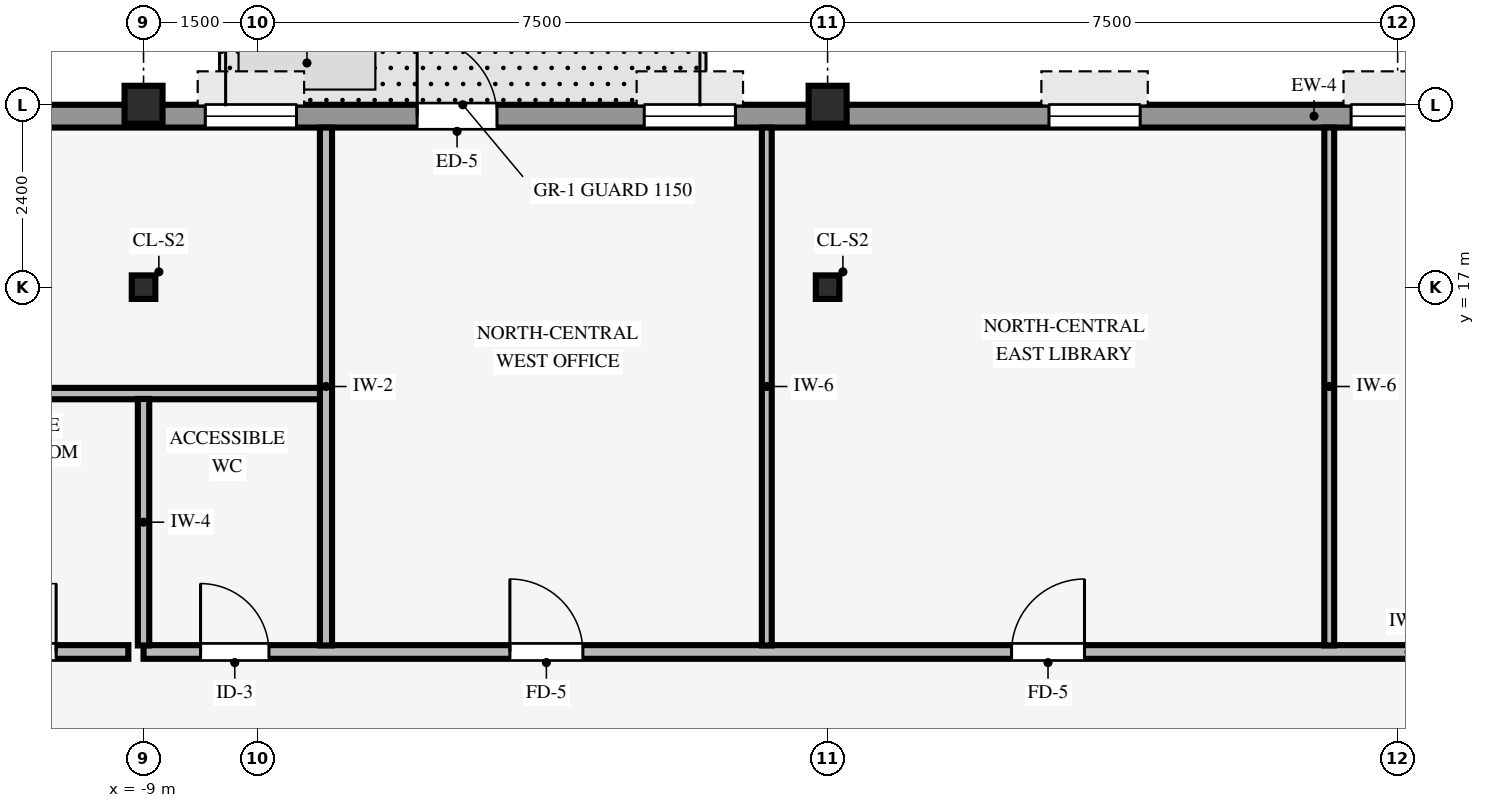
"""IFC4 building model, lengths in metres.
Left out: names, types, materials, properties, quantities, classifications, styles, units other than length and angle.
Written with IfcOpenShell. Run it as: python <this file> out.ifc"""

import sys

from ifc_helpers import new_model, si_unit, direction, frame, frame_2d, origin, origin_2d, place, context, subcontext, project, spatial, rectangle, hollow_rectangle, i_section, extrude, source, transform, mapped, element, fill, save


model = new_model("IFC4")
c1 = context("Model", 3, precision=1e-05, world=origin(), true_north=direction((0.0, 1.0)))
c2 = subcontext(c1, "Body", "Model", "MODEL_VIEW")
j1 = project(units=[si_unit("LENGTHUNIT", "METRE"), si_unit("PLANEANGLEUNIT", "RADIAN")], contexts=[c1])
p1 = place(None, origin())
s1 = spatial("IfcSite", under=j1, at=p1, CompositionType="ELEMENT")
p2 = place(p1, origin())
s2 = spatial("IfcBuilding", under=s1, at=p2, CompositionType="ELEMENT")
p3 = place(p2, frame((0.0, 0.0, 242.0)))
s3 = spatial("IfcBuildingStorey", under=s2, at=p3, CompositionType="ELEMENT", Elevation=242.0)
for number, where, z_axis, x_axis in (
    (1, (-9.0, 19.4, 0.0), (0.0, 0.0, 1.0), (1.0, 0.0, 0.0)),
    (2, (0.0, 19.4, 0.0), (0.0, 0.0, 1.0), (1.0, 0.0, 0.0)),
):
    element("IfcColumn", number, at=place(p3, frame(where, z_axis=z_axis, x_axis=x_axis)), inside=s3, PredefinedType="COLUMN", context=c2, shape_type="SweptSolid", body=[
        extrude(hollow_rectangle(XDim=0.5, YDim=0.5, WallThickness=0.032, InnerFilletRadius=0.032, OuterFilletRadius=0.064, at=origin_2d()), origin(), (0.0, 0.0, 1.0), 3.25),
    ])
for number, where, z_axis, x_axis in (
    (3, (0.0, 17.0, 0.0), (0.0, 0.0, 1.0), (1.0, 0.0, 0.0)),
    (4, (-9.0, 17.0, 0.0), (0.0, 0.0, 1.0), (1.0, 0.0, 0.0)),
):
    element("IfcColumn", number, at=place(p3, frame(where, z_axis=z_axis, x_axis=x_axis)), inside=s3, PredefinedType="COLUMN", context=c2, shape_type="SweptSolid", body=[
        extrude(i_section(OverallWidth=0.31, OverallDepth=0.31, WebThickness=0.015, FlangeThickness=0.015, FilletRadius=0.015, at=origin_2d()), origin(), (0.0, 0.0, 1.0), 3.25),
    ])
p4 = place(p3, frame((-24.3, 19.25, 0.0), z_axis=(0.0, 0.0, 1.0), x_axis=(1.0, 0.0, 0.0)))
e5 = element("IfcWall", 5, at=p4, inside=s3, PredefinedType="STANDARD", context=c2, shape_type="SweptSolid", body=[
    extrude(rectangle(XDim=41.0, YDim=0.3, at=frame_2d((20.5, 0.0))), origin(), (0.0, 0.0, 1.0), 2.585),
])
p5 = place(p4, frame((18.9, 0.0, 0.0)))
e6 = element("IfcOpeningElement", 6, at=p5, cuts=e5, PredefinedType="OPENING", context=c2, shape_type="SweptSolid", body=[
    extrude(rectangle(XDim=1.05, YDim=2.1, at=frame_2d((0.525, 1.05))), frame((0.0, 0.16, 0.0), z_axis=(0.0, -1.0, 0.0), x_axis=(1.0, 0.0, 0.0)), (0.0, 0.0, 1.0), 0.32),
])
p6 = place(p4, frame((2.837, 0.0, 0.8)))
e7 = element("IfcOpeningElement", 7, at=p6, cuts=e5, PredefinedType="OPENING", context=c2, shape_type="SweptSolid", body=[
    extrude(rectangle(XDim=1.2, YDim=1.48, at=frame_2d((0.6, 0.74))), frame((0.0, 0.16, 0.0), z_axis=(0.0, -1.0, 0.0), x_axis=(1.0, 0.0, 0.0)), (0.0, 0.0, 1.0), 0.32),
])
p7 = place(p4, frame((7.712, 0.0, 0.8)))
e8 = element("IfcOpeningElement", 8, at=p7, cuts=e5, PredefinedType="OPENING", context=c2, shape_type="SweptSolid", body=[
    extrude(rectangle(XDim=1.2, YDim=1.48, at=frame_2d((0.6, 0.74))), frame((0.0, 0.16, 0.0), z_axis=(0.0, -1.0, 0.0), x_axis=(1.0, 0.0, 0.0)), (0.0, 0.0, 1.0), 0.32),
])
p8 = place(p4, frame((12.587, 0.0, 0.8)))
e9 = element("IfcOpeningElement", 9, at=p8, cuts=e5, PredefinedType="OPENING", context=c2, shape_type="SweptSolid", body=[
    extrude(rectangle(XDim=1.2, YDim=1.48, at=frame_2d((0.6, 0.74))), frame((0.0, 0.16, 0.0), z_axis=(0.0, -1.0, 0.0), x_axis=(1.0, 0.0, 0.0)), (0.0, 0.0, 1.0), 0.32),
])
p9 = place(p4, frame((16.113, 0.0, 0.8)))
e10 = element("IfcOpeningElement", 10, at=p9, cuts=e5, PredefinedType="OPENING", context=c2, shape_type="SweptSolid", body=[
    extrude(rectangle(XDim=1.2, YDim=1.48, at=frame_2d((0.6, 0.74))), frame((0.0, 0.16, 0.0), z_axis=(0.0, -1.0, 0.0), x_axis=(1.0, 0.0, 0.0)), (0.0, 0.0, 1.0), 0.32),
])
p10 = place(p4, frame((21.887, 0.0, 0.8)))
e11 = element("IfcOpeningElement", 11, at=p10, cuts=e5, PredefinedType="OPENING", context=c2, shape_type="SweptSolid", body=[
    extrude(rectangle(XDim=1.2, YDim=1.48, at=frame_2d((0.6, 0.74))), frame((0.0, 0.16, 0.0), z_axis=(0.0, -1.0, 0.0), x_axis=(1.0, 0.0, 0.0)), (0.0, 0.0, 1.0), 0.32),
])
p11 = place(p4, frame((27.212, 0.0, 0.8)))
e12 = element("IfcOpeningElement", 12, at=p11, cuts=e5, PredefinedType="OPENING", context=c2, shape_type="SweptSolid", body=[
    extrude(rectangle(XDim=1.2, YDim=1.48, at=frame_2d((0.6, 0.74))), frame((0.0, 0.16, 0.0), z_axis=(0.0, -1.0, 0.0), x_axis=(1.0, 0.0, 0.0)), (0.0, 0.0, 1.0), 0.32),
])
p12 = place(p4, frame((31.188, 0.0, 0.8)))
e13 = element("IfcOpeningElement", 13, at=p12, cuts=e5, PredefinedType="OPENING", context=c2, shape_type="SweptSolid", body=[
    extrude(rectangle(XDim=1.2, YDim=1.48, at=frame_2d((0.6, 0.74))), frame((0.0, 0.16, 0.0), z_axis=(0.0, -1.0, 0.0), x_axis=(1.0, 0.0, 0.0)), (0.0, 0.0, 1.0), 0.32),
])
p13 = place(p4, frame((36.962, 0.0, 0.8)))
e14 = element("IfcOpeningElement", 14, at=p13, cuts=e5, PredefinedType="OPENING", context=c2, shape_type="SweptSolid", body=[
    extrude(rectangle(XDim=1.2, YDim=1.48, at=frame_2d((0.6, 0.74))), frame((0.0, 0.16, 0.0), z_axis=(0.0, -1.0, 0.0), x_axis=(1.0, 0.0, 0.0)), (0.0, 0.0, 1.0), 0.32),
])
p14 = place(p3, frame((-14.8, 12.2, 0.0), z_axis=(0.0, 0.0, 1.0), x_axis=(1.0, 0.0, 0.0)))
e15 = element("IfcWall", 15, at=p14, inside=s3, PredefinedType="PARTITIONING", context=c2, shape_type="SweptSolid", body=[
    extrude(rectangle(XDim=5.6, YDim=0.18, at=frame_2d((2.8, 0.0))), origin(), (0.0, 0.0, 1.0), 3.24),
])
p15 = place(p14, frame((0.95, 0.0, 0.0)))
e16 = element("IfcOpeningElement", 16, at=p15, cuts=e15, PredefinedType="OPENING", context=c2, shape_type="SweptSolid", body=[
    extrude(rectangle(XDim=0.9, YDim=2.1, at=frame_2d((0.45, 1.05))), frame((0.0, 0.1, 0.0), z_axis=(0.0, -1.0, 0.0), x_axis=(1.0, 0.0, 0.0)), (0.0, 0.0, 1.0), 0.2),
])
p16 = place(p14, frame((3.75, 0.0, 0.0)))
e17 = element("IfcOpeningElement", 17, at=p16, cuts=e15, PredefinedType="OPENING", context=c2, shape_type="SweptSolid", body=[
    extrude(rectangle(XDim=0.9, YDim=2.1, at=frame_2d((0.45, 1.05))), frame((0.0, 0.1, 0.0), z_axis=(0.0, -1.0, 0.0), x_axis=(1.0, 0.0, 0.0)), (0.0, 0.0, 1.0), 0.2),
])
p17 = place(p3, frame((-9.0, 12.2, 0.0), z_axis=(0.0, 0.0, 1.0), x_axis=(1.0, 0.0, 0.0)))
e18 = element("IfcWall", 18, at=p17, inside=s3, PredefinedType="PARTITIONING", context=c2, shape_type="SweptSolid", body=[
    extrude(rectangle(XDim=24.8, YDim=0.18, at=frame_2d((12.4, 0.0))), origin(), (0.0, 0.0, 1.0), 3.24),
])
p18 = place(p17, frame((11.42, 0.0, 0.0)))
e19 = element("IfcOpeningElement", 19, at=p18, cuts=e18, PredefinedType="OPENING", context=c2, shape_type="SweptSolid", body=[
    extrude(rectangle(XDim=0.96, YDim=2.1, at=frame_2d((0.48, 1.05))), frame((0.0, 0.1, 0.0), z_axis=(0.0, -1.0, 0.0), x_axis=(1.0, 0.0, 0.0)), (0.0, 0.0, 1.0), 0.2),
])
p19 = place(p17, frame((20.92, 0.0, 0.0)))
e20 = element("IfcOpeningElement", 20, at=p19, cuts=e18, PredefinedType="OPENING", context=c2, shape_type="SweptSolid", body=[
    extrude(rectangle(XDim=0.96, YDim=2.1, at=frame_2d((0.48, 1.05))), frame((0.0, 0.1, 0.0), z_axis=(0.0, -1.0, 0.0), x_axis=(1.0, 0.0, 0.0)), (0.0, 0.0, 1.0), 0.2),
])
p20 = place(p17, frame((4.82, 0.0, 0.0)))
e21 = element("IfcOpeningElement", 21, at=p20, cuts=e18, PredefinedType="OPENING", context=c2, shape_type="SweptSolid", body=[
    extrude(rectangle(XDim=0.96, YDim=2.1, at=frame_2d((0.48, 1.05))), frame((0.0, 0.1, 0.0), z_axis=(0.0, -1.0, 0.0), x_axis=(1.0, 0.0, 0.0)), (0.0, 0.0, 1.0), 0.2),
])
p21 = place(p17, frame((0.75, 0.0, 0.0)))
e22 = element("IfcOpeningElement", 22, at=p21, cuts=e18, PredefinedType="OPENING", context=c2, shape_type="SweptSolid", body=[
    extrude(rectangle(XDim=0.9, YDim=2.1, at=frame_2d((0.45, 1.05))), frame((0.0, 0.1, 0.0), z_axis=(0.0, -1.0, 0.0), x_axis=(1.0, 0.0, 0.0)), (0.0, 0.0, 1.0), 0.2),
])
p22 = place(p3, frame((-14.8, 15.6, 0.0), z_axis=(0.0, 0.0, 1.0), x_axis=(1.0, 0.0, 0.0)))
e23 = element("IfcWall", 23, at=p22, inside=s3, PredefinedType="PARTITIONING", context=c2, shape_type="SweptSolid", body=[
    extrude(rectangle(XDim=8.129, YDim=0.15, at=frame_2d((4.064, 0.0))), origin(), (0.0, 0.0, 1.0), 3.24),
])
p23 = place(p3, frame((-9.0, 12.286, 0.0), z_axis=(0.0, 0.0, 1.0), x_axis=(0.0, 1.0, 0.0)))
e24 = element("IfcWall", 24, at=p23, inside=s3, PredefinedType="PARTITIONING", context=c2, shape_type="SweptSolid", body=[
    extrude(rectangle(XDim=3.243, YDim=0.15, at=frame_2d((1.622, 0.0))), origin(), (0.0, 0.0, 1.0), 2.772),
])
p24 = place(p3, frame((-6.6, 12.286, 0.0), z_axis=(0.0, 0.0, 1.0), x_axis=(0.0, 1.0, 0.0)))
e25 = element("IfcWall", 25, at=p24, inside=s3, PredefinedType="PARTITIONING", context=c2, shape_type="SweptSolid", body=[
    extrude(rectangle(XDim=6.814, YDim=0.16, at=frame_2d((3.407, 0.0))), origin(), (0.0, 0.0, 1.0), 3.24),
])
for number, where, z_axis, x_axis in (
    (26, (-0.8, 12.286, 0.0), (0.0, 0.0, 1.0), (0.0, 1.0, 0.0)),
    (27, (6.6, 12.286, 0.0), (0.0, 0.0, 1.0), (0.0, 1.0, 0.0)),
):
    element("IfcWall", number, at=place(p3, frame(where, z_axis=z_axis, x_axis=x_axis)), inside=s3, PredefinedType="PARTITIONING", context=c2, shape_type="SweptSolid", body=[
        extrude(rectangle(XDim=6.814, YDim=0.13, at=frame_2d((3.407, 0.0))), origin(), (0.0, 0.0, 1.0), 3.24),
    ])
m1 = source(origin(), c2, "Body", "SweptSolid", [
    extrude(rectangle(XDim=1.05, YDim=2.1, at=frame_2d((0.525, 1.05))), frame((0.0, 0.025, 0.0), z_axis=(0.0, -1.0, 0.0), x_axis=(1.0, 0.0, 0.0)), (0.0, 0.0, 1.0), 0.05),
])
p25 = place(p5, origin())
e28 = element("IfcDoor", 28, at=p25, inside=s3, OperationType="SINGLE_SWING_LEFT", PredefinedType="DOOR", context=c2, shape_type="MappedRepresentation", body=[
    mapped(m1, transform((0.0, 0.0, 0.0), scale=1.0)),
])
fill(e6, e28)
m2 = source(origin(), c2, "Body", "SweptSolid", [
    extrude(rectangle(XDim=1.2, YDim=1.48, at=frame_2d((0.6, 0.74))), frame((0.0, 0.03, 0.0), z_axis=(0.0, -1.0, 0.0), x_axis=(1.0, 0.0, 0.0)), (0.0, 0.0, 1.0), 0.06),
])
p26 = place(p9, origin())
e29 = element("IfcWindow", 29, at=p26, inside=s3, PartitioningType="SINGLE_PANEL", PredefinedType="WINDOW", context=c2, shape_type="MappedRepresentation", body=[
    mapped(m2, transform((0.0, 0.0, 0.0), scale=1.0)),
])
fill(e10, e29)
p27 = place(p10, origin())
e30 = element("IfcWindow", 30, at=p27, inside=s3, PartitioningType="SINGLE_PANEL", PredefinedType="WINDOW", context=c2, shape_type="MappedRepresentation", body=[
    mapped(m2, transform((0.0, 0.0, 0.0), scale=1.0)),
])
fill(e11, e30)
p28 = place(p11, origin())
e31 = element("IfcWindow", 31, at=p28, inside=s3, PartitioningType="SINGLE_PANEL", PredefinedType="WINDOW", context=c2, shape_type="MappedRepresentation", body=[
    mapped(m2, transform((0.0, 0.0, 0.0), scale=1.0)),
])
fill(e12, e31)
p29 = place(p12, origin())
e32 = element("IfcWindow", 32, at=p29, inside=s3, PartitioningType="SINGLE_PANEL", PredefinedType="WINDOW", context=c2, shape_type="MappedRepresentation", body=[
    mapped(m2, transform((0.0, 0.0, 0.0), scale=1.0)),
])
fill(e13, e32)
m3 = source(origin(), c2, "Body", "SweptSolid", [
    extrude(rectangle(XDim=0.96, YDim=2.1, at=frame_2d((0.48, 1.05))), frame((0.0, 0.025, 0.0), z_axis=(0.0, -1.0, 0.0), x_axis=(1.0, 0.0, 0.0)), (0.0, 0.0, 1.0), 0.05),
])
p30 = place(p18, origin())
e33 = element("IfcDoor", 33, at=p30, inside=s3, OperationType="SINGLE_SWING_RIGHT", PredefinedType="DOOR", context=c2, shape_type="MappedRepresentation", body=[
    mapped(m3, transform((0.0, 0.0, 0.0), scale=1.0)),
])
fill(e19, e33)
p31 = place(p20, origin())
e34 = element("IfcDoor", 34, at=p31, inside=s3, OperationType="SINGLE_SWING_LEFT", PredefinedType="DOOR", context=c2, shape_type="MappedRepresentation", body=[
    mapped(m3, transform((0.0, 0.0, 0.0), scale=1.0)),
])
fill(e21, e34)
m4 = source(origin(), c2, "Body", "SweptSolid", [
    extrude(rectangle(XDim=0.9, YDim=2.1, at=frame_2d((0.45, 1.05))), frame((0.0, 0.025, 0.0), z_axis=(0.0, -1.0, 0.0), x_axis=(1.0, 0.0, 0.0)), (0.0, 0.0, 1.0), 0.05),
])
p32 = place(p16, origin())
e35 = element("IfcDoor", 35, at=p32, inside=s3, OperationType="SINGLE_SWING_RIGHT", PredefinedType="DOOR", context=c2, shape_type="MappedRepresentation", body=[
    mapped(m4, transform((0.0, 0.0, 0.0), scale=1.0)),
])
fill(e17, e35)
p33 = place(p21, origin())
e36 = element("IfcDoor", 36, at=p33, inside=s3, OperationType="SINGLE_SWING_LEFT", PredefinedType="DOOR", context=c2, shape_type="MappedRepresentation", body=[
    mapped(m4, transform((0.0, 0.0, 0.0), scale=1.0)),
])
fill(e22, e36)
save(model, sys.argv[1])
